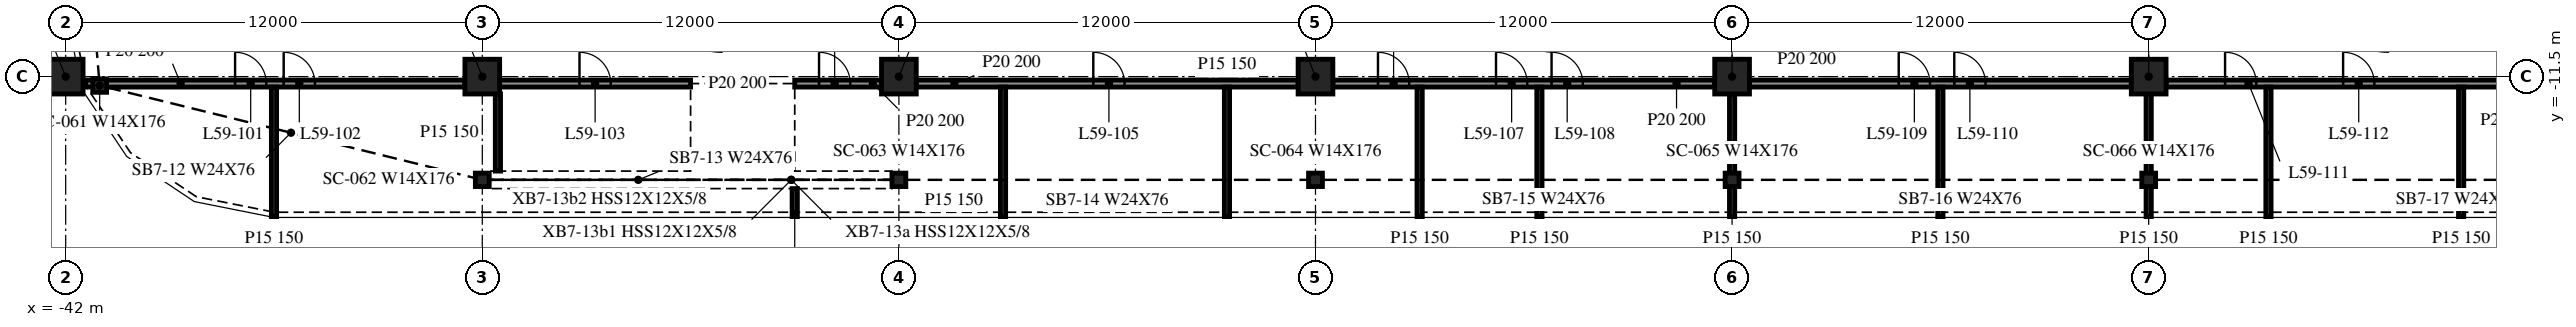
"""IFC4 building model, lengths in metres.
Left out: names, types, materials, properties, quantities, classifications, styles, units other than length and angle.
Written with IfcOpenShell. Run it as: python <this file> out.ifc"""

import sys

from ifc_helpers import new_model, si_unit, direction, frame, frame_2d, origin, origin_2d, place, context, subcontext, project, spatial, rectangle, i_section, extrude, element, fill, save


model = new_model("IFC4")
c1 = context("Model", 3, precision=1e-05, world=origin(), true_north=direction((0.0, 1.0)))
c2 = subcontext(c1, "Body", "Model", "MODEL_VIEW")
j1 = project(units=[si_unit("LENGTHUNIT", "METRE"), si_unit("PLANEANGLEUNIT", "RADIAN")], contexts=[c1])
p1 = place(None, origin())
s1 = spatial("IfcSite", under=j1, at=p1, CompositionType="ELEMENT")
p2 = place(p1, origin())
s2 = spatial("IfcBuilding", under=s1, at=p2, CompositionType="ELEMENT")
p3 = place(p2, frame((0.0, 0.0, 243.8)))
s3 = spatial("IfcBuildingStorey", under=s2, at=p3, CompositionType="ELEMENT", Elevation=243.8)
for number, where, z_axis, x_axis in (
    (1, (-42.0, -11.5, -0.34), (0.0, 0.0, 1.0), (1.0, 0.0, 0.0)),
    (2, (-30.0, -11.5, -0.34), (0.0, 0.0, 1.0), (1.0, 0.0, 0.0)),
    (3, (-18.0, -11.5, -0.34), (0.0, 0.0, 1.0), (1.0, 0.0, 0.0)),
    (4, (-6.0, -11.5, -0.34), (0.0, 0.0, 1.0), (1.0, 0.0, 0.0)),
    (5, (6.0, -11.5, -0.34), (0.0, 0.0, 1.0), (1.0, 0.0, 0.0)),
    (6, (18.0, -11.5, -0.34), (0.0, 0.0, 1.0), (1.0, 0.0, 0.0)),
):
    element("IfcColumn", number, at=place(p3, frame(where, z_axis=z_axis, x_axis=x_axis)), inside=s3, PredefinedType="COLUMN", context=c2, shape_type="SweptSolid", body=[
        extrude(rectangle(XDim=1.0, YDim=1.0, at=origin_2d()), origin(), (0.0, 0.0, 1.0), 3.8),
    ])
for number, where, z_axis, x_axis in (
    (7, (-41.021, -11.758, -0.34), (0.0, 0.0, 1.0), (1.0, 0.0, 0.0)),
    (8, (-30.0, -14.473, -0.34), (0.0, 0.0, 1.0), (1.0, 0.0, 0.0)),
    (9, (-18.0, -14.473, -0.34), (0.0, 0.0, 1.0), (1.0, 0.0, 0.0)),
    (10, (-6.0, -14.473, -0.34), (0.0, 0.0, 1.0), (1.0, 0.0, 0.0)),
    (11, (6.0, -14.473, -0.34), (0.0, 0.0, 1.0), (1.0, 0.0, 0.0)),
    (12, (18.0, -14.473, -0.34), (0.0, 0.0, 1.0), (1.0, 0.0, 0.0)),
):
    element("IfcColumn", number, at=place(p3, frame(where, z_axis=z_axis, x_axis=x_axis)), inside=s3, PredefinedType="COLUMN", context=c2, shape_type="SweptSolid", body=[
        extrude(i_section(OverallWidth=0.399, OverallDepth=0.386, WebThickness=0.021, FlangeThickness=0.033, at=origin_2d()), origin(), (0.0, 0.0, 1.0), 3.8),
    ])
p4 = place(p3, frame((-41.421, -11.7, 0.0), z_axis=(0.0, 0.0, 1.0), x_axis=(1.0, 0.0, 0.0)))
e13 = element("IfcWall", 13, at=p4, inside=s3, PredefinedType="PARTITIONING", context=c2, shape_type="SweptSolid", body=[
    extrude(rectangle(XDim=10.921, YDim=0.2, at=frame_2d((5.46, 0.0))), origin(), (0.0, 0.0, 1.0), 3.46),
])
p5 = place(p4, frame((4.3, 0.0, 0.0)))
e14 = element("IfcOpeningElement", 14, at=p5, cuts=e13, PredefinedType="OPENING", context=c2, shape_type="SweptSolid", body=[
    extrude(rectangle(XDim=0.9, YDim=2.1, at=frame_2d((0.45, 1.05))), frame((0.0, 0.11, 0.0), z_axis=(0.0, -1.0, 0.0), x_axis=(1.0, 0.0, 0.0)), (0.0, 0.0, 1.0), 0.22),
])
p6 = place(p4, frame((5.7, 0.0, 0.0)))
e15 = element("IfcOpeningElement", 15, at=p6, cuts=e13, PredefinedType="OPENING", context=c2, shape_type="SweptSolid", body=[
    extrude(rectangle(XDim=0.9, YDim=2.1, at=frame_2d((0.45, 1.05))), frame((0.0, 0.11, 0.0), z_axis=(0.0, -1.0, 0.0), x_axis=(1.0, 0.0, 0.0)), (0.0, 0.0, 1.0), 0.22),
])
p7 = place(p3, frame((-29.5, -11.7, 0.0), z_axis=(0.0, 0.0, 1.0), x_axis=(1.0, 0.0, 0.0)))
e16 = element("IfcWall", 16, at=p7, inside=s3, PredefinedType="PARTITIONING", context=c2, shape_type="SweptSolid", body=[
    extrude(rectangle(XDim=5.5, YDim=0.2, at=frame_2d((2.75, 0.0))), origin(), (0.0, 0.0, 1.0), 3.46),
])
p8 = place(p7, frame((2.3, 0.0, 0.0)))
e17 = element("IfcOpeningElement", 17, at=p8, cuts=e16, PredefinedType="OPENING", context=c2, shape_type="SweptSolid", body=[
    extrude(rectangle(XDim=0.9, YDim=2.1, at=frame_2d((0.45, 1.05))), frame((0.0, 0.11, 0.0), z_axis=(0.0, -1.0, 0.0), x_axis=(1.0, 0.0, 0.0)), (0.0, 0.0, 1.0), 0.22),
])
p9 = place(p3, frame((-21.0, -11.7, 0.0), z_axis=(0.0, 0.0, 1.0), x_axis=(1.0, 0.0, 0.0)))
e18 = element("IfcWall", 18, at=p9, inside=s3, PredefinedType="PARTITIONING", context=c2, shape_type="SweptSolid", body=[
    extrude(rectangle(XDim=2.5, YDim=0.2, at=frame_2d((1.25, 0.0))), origin(), (0.0, 0.0, 1.0), 3.46),
])
p10 = place(p9, frame((0.7, 0.0, 0.0)))
e19 = element("IfcOpeningElement", 19, at=p10, cuts=e18, PredefinedType="OPENING", context=c2, shape_type="SweptSolid", body=[
    extrude(rectangle(XDim=0.9, YDim=2.1, at=frame_2d((0.45, 1.05))), frame((0.0, 0.11, 0.0), z_axis=(0.0, -1.0, 0.0), x_axis=(1.0, 0.0, 0.0)), (0.0, 0.0, 1.0), 0.22),
])
p11 = place(p3, frame((-17.5, -11.7, 0.0), z_axis=(0.0, 0.0, 1.0), x_axis=(1.0, 0.0, 0.0)))
e20 = element("IfcWall", 20, at=p11, inside=s3, PredefinedType="PARTITIONING", context=c2, shape_type="SweptSolid", body=[
    extrude(rectangle(XDim=11.0, YDim=0.2, at=frame_2d((5.5, 0.0))), origin(), (0.0, 0.0, 1.0), 3.46),
])
p12 = place(p11, frame((5.1, 0.0, 0.0)))
e21 = element("IfcOpeningElement", 21, at=p12, cuts=e20, PredefinedType="OPENING", context=c2, shape_type="SweptSolid", body=[
    extrude(rectangle(XDim=0.9, YDim=2.1, at=frame_2d((0.45, 1.05))), frame((0.0, 0.11, 0.0), z_axis=(0.0, -1.0, 0.0), x_axis=(1.0, 0.0, 0.0)), (0.0, 0.0, 1.0), 0.22),
])
p13 = place(p3, frame((-5.5, -11.7, 0.0), z_axis=(0.0, 0.0, 1.0), x_axis=(1.0, 0.0, 0.0)))
e22 = element("IfcWall", 22, at=p13, inside=s3, PredefinedType="PARTITIONING", context=c2, shape_type="SweptSolid", body=[
    extrude(rectangle(XDim=11.0, YDim=0.2, at=frame_2d((5.5, 0.0))), origin(), (0.0, 0.0, 1.0), 3.46),
])
p14 = place(p13, frame((1.3, 0.0, 0.0)))
e23 = element("IfcOpeningElement", 23, at=p14, cuts=e22, PredefinedType="OPENING", context=c2, shape_type="SweptSolid", body=[
    extrude(rectangle(XDim=0.9, YDim=2.1, at=frame_2d((0.45, 1.05))), frame((0.0, 0.11, 0.0), z_axis=(0.0, -1.0, 0.0), x_axis=(1.0, 0.0, 0.0)), (0.0, 0.0, 1.0), 0.22),
])
p15 = place(p13, frame((4.7, 0.0, 0.0)))
e24 = element("IfcOpeningElement", 24, at=p15, cuts=e22, PredefinedType="OPENING", context=c2, shape_type="SweptSolid", body=[
    extrude(rectangle(XDim=0.9, YDim=2.1, at=frame_2d((0.45, 1.05))), frame((0.0, 0.11, 0.0), z_axis=(0.0, -1.0, 0.0), x_axis=(1.0, 0.0, 0.0)), (0.0, 0.0, 1.0), 0.22),
])
p16 = place(p13, frame((6.3, 0.0, 0.0)))
e25 = element("IfcOpeningElement", 25, at=p16, cuts=e22, PredefinedType="OPENING", context=c2, shape_type="SweptSolid", body=[
    extrude(rectangle(XDim=0.9, YDim=2.1, at=frame_2d((0.45, 1.05))), frame((0.0, 0.11, 0.0), z_axis=(0.0, -1.0, 0.0), x_axis=(1.0, 0.0, 0.0)), (0.0, 0.0, 1.0), 0.22),
])
p17 = place(p3, frame((6.5, -11.7, 0.0), z_axis=(0.0, 0.0, 1.0), x_axis=(1.0, 0.0, 0.0)))
e26 = element("IfcWall", 26, at=p17, inside=s3, PredefinedType="PARTITIONING", context=c2, shape_type="SweptSolid", body=[
    extrude(rectangle(XDim=11.0, YDim=0.2, at=frame_2d((5.5, 0.0))), origin(), (0.0, 0.0, 1.0), 3.46),
])
p18 = place(p17, frame((4.3, 0.0, 0.0)))
e27 = element("IfcOpeningElement", 27, at=p18, cuts=e26, PredefinedType="OPENING", context=c2, shape_type="SweptSolid", body=[
    extrude(rectangle(XDim=0.9, YDim=2.1, at=frame_2d((0.45, 1.05))), frame((0.0, 0.11, 0.0), z_axis=(0.0, -1.0, 0.0), x_axis=(1.0, 0.0, 0.0)), (0.0, 0.0, 1.0), 0.22),
])
p19 = place(p17, frame((5.9, 0.0, 0.0)))
e28 = element("IfcOpeningElement", 28, at=p19, cuts=e26, PredefinedType="OPENING", context=c2, shape_type="SweptSolid", body=[
    extrude(rectangle(XDim=0.9, YDim=2.1, at=frame_2d((0.45, 1.05))), frame((0.0, 0.11, 0.0), z_axis=(0.0, -1.0, 0.0), x_axis=(1.0, 0.0, 0.0)), (0.0, 0.0, 1.0), 0.22),
])
p20 = place(p3, frame((18.5, -11.7, 0.0), z_axis=(0.0, 0.0, 1.0), x_axis=(1.0, 0.0, 0.0)))
e29 = element("IfcWall", 29, at=p20, inside=s3, PredefinedType="PARTITIONING", context=c2, shape_type="SweptSolid", body=[
    extrude(rectangle(XDim=11.0, YDim=0.2, at=frame_2d((5.5, 0.0))), origin(), (0.0, 0.0, 1.0), 3.46),
])
p21 = place(p20, frame((1.7, 0.0, 0.0)))
e30 = element("IfcOpeningElement", 30, at=p21, cuts=e29, PredefinedType="OPENING", context=c2, shape_type="SweptSolid", body=[
    extrude(rectangle(XDim=0.9, YDim=2.1, at=frame_2d((0.45, 1.05))), frame((0.0, 0.11, 0.0), z_axis=(0.0, -1.0, 0.0), x_axis=(1.0, 0.0, 0.0)), (0.0, 0.0, 1.0), 0.22),
])
p22 = place(p20, frame((5.1, 0.0, 0.0)))
e31 = element("IfcOpeningElement", 31, at=p22, cuts=e29, PredefinedType="OPENING", context=c2, shape_type="SweptSolid", body=[
    extrude(rectangle(XDim=0.9, YDim=2.1, at=frame_2d((0.45, 1.05))), frame((0.0, 0.11, 0.0), z_axis=(0.0, -1.0, 0.0), x_axis=(1.0, 0.0, 0.0)), (0.0, 0.0, 1.0), 0.22),
])
p23 = place(p3, frame((-36.0, -15.531, 0.0), z_axis=(0.0, 0.0, 1.0), x_axis=(0.0, 1.0, 0.0)))
e32 = element("IfcWall", 32, at=p23, inside=s3, PredefinedType="PARTITIONING", context=c2, shape_type="SweptSolid", body=[
    extrude(rectangle(XDim=3.731, YDim=0.15, at=frame_2d((1.865, 0.0))), origin(), (0.0, 0.0, 1.0), 3.46),
])
p24 = place(p3, frame((-29.55, -14.221, 0.0), z_axis=(0.0, 0.0, 1.0), x_axis=(0.0, 1.0, 0.0)))
e33 = element("IfcWall", 33, at=p24, inside=s3, PredefinedType="PARTITIONING", context=c2, shape_type="SweptSolid", body=[
    extrude(rectangle(XDim=2.221, YDim=0.15, at=frame_2d((1.11, 0.0))), origin(), (0.0, 0.0, 1.0), 3.46),
])
p25 = place(p3, frame((-21.0, -15.531, 0.0), z_axis=(0.0, 0.0, 1.0), x_axis=(0.0, 1.0, 0.0)))
e34 = element("IfcWall", 34, at=p25, inside=s3, PredefinedType="PARTITIONING", context=c2, shape_type="SweptSolid", body=[
    extrude(rectangle(XDim=0.806, YDim=0.15, at=frame_2d((0.403, 0.0))), origin(), (0.0, 0.0, 1.0), 3.46),
])
for number, where, z_axis, x_axis in (
    (35, (-15.0, -15.531, 0.0), (0.0, 0.0, 1.0), (0.0, 1.0, 0.0)),
    (36, (-8.55, -15.531, 0.0), (0.0, 0.0, 1.0), (0.0, 1.0, 0.0)),
    (37, (-3.0, -15.531, 0.0), (0.0, 0.0, 1.0), (0.0, 1.0, 0.0)),
    (38, (0.45, -15.531, 0.0), (0.0, 0.0, 1.0), (0.0, 1.0, 0.0)),
):
    element("IfcWall", number, at=place(p3, frame(where, z_axis=z_axis, x_axis=x_axis)), inside=s3, PredefinedType="PARTITIONING", context=c2, shape_type="SweptSolid", body=[
        extrude(rectangle(XDim=3.731, YDim=0.15, at=frame_2d((1.865, 0.0))), origin(), (0.0, 0.0, 1.0), 3.46),
    ])
p26 = place(p3, frame((6.0, -15.531, 0.0), z_axis=(0.0, 0.0, 1.0), x_axis=(0.0, 1.0, 0.0)))
e39 = element("IfcWall", 39, at=p26, inside=s3, PredefinedType="PARTITIONING", context=c2, shape_type="SweptSolid", body=[
    extrude(rectangle(XDim=3.531, YDim=0.15, at=frame_2d((1.766, 0.0))), origin(), (0.0, 0.0, 1.0), 3.46),
])
p27 = place(p3, frame((12.0, -15.531, 0.0), z_axis=(0.0, 0.0, 1.0), x_axis=(0.0, 1.0, 0.0)))
e40 = element("IfcWall", 40, at=p27, inside=s3, PredefinedType="PARTITIONING", context=c2, shape_type="SweptSolid", body=[
    extrude(rectangle(XDim=3.731, YDim=0.15, at=frame_2d((1.865, 0.0))), origin(), (0.0, 0.0, 1.0), 3.46),
])
p28 = place(p3, frame((18.0, -15.531, 0.0), z_axis=(0.0, 0.0, 1.0), x_axis=(0.0, 1.0, 0.0)))
e41 = element("IfcWall", 41, at=p28, inside=s3, PredefinedType="PARTITIONING", context=c2, shape_type="SweptSolid", body=[
    extrude(rectangle(XDim=3.531, YDim=0.15, at=frame_2d((1.766, 0.0))), origin(), (0.0, 0.0, 1.0), 3.46),
])
for number, where, z_axis, x_axis in (
    (42, (21.45, -15.531, 0.0), (0.0, 0.0, 1.0), (0.0, 1.0, 0.0)),
    (43, (27.0, -15.531, 0.0), (0.0, 0.0, 1.0), (0.0, 1.0, 0.0)),
):
    element("IfcWall", number, at=place(p3, frame(where, z_axis=z_axis, x_axis=x_axis)), inside=s3, PredefinedType="PARTITIONING", context=c2, shape_type="SweptSolid", body=[
        extrude(rectangle(XDim=3.731, YDim=0.15, at=frame_2d((1.865, 0.0))), origin(), (0.0, 0.0, 1.0), 3.46),
    ])
p29 = place(p5, origin())
e44 = element("IfcDoor", 44, at=p29, inside=s3, OperationType="SINGLE_SWING_RIGHT", PredefinedType="DOOR", context=c2, shape_type="SweptSolid", body=[
    extrude(rectangle(XDim=0.9, YDim=2.1, at=frame_2d((0.45, 1.05))), frame((0.0, 0.025, 0.0), z_axis=(0.0, -1.0, 0.0), x_axis=(1.0, 0.0, 0.0)), (0.0, 0.0, 1.0), 0.05),
])
fill(e14, e44)
p30 = place(p6, origin())
e45 = element("IfcDoor", 45, at=p30, inside=s3, OperationType="SINGLE_SWING_LEFT", PredefinedType="DOOR", context=c2, shape_type="SweptSolid", body=[
    extrude(rectangle(XDim=0.9, YDim=2.1, at=frame_2d((0.45, 1.05))), frame((0.0, 0.025, 0.0), z_axis=(0.0, -1.0, 0.0), x_axis=(1.0, 0.0, 0.0)), (0.0, 0.0, 1.0), 0.05),
])
fill(e15, e45)
p31 = place(p8, origin())
e46 = element("IfcDoor", 46, at=p31, inside=s3, OperationType="SINGLE_SWING_RIGHT", PredefinedType="DOOR", context=c2, shape_type="SweptSolid", body=[
    extrude(rectangle(XDim=0.9, YDim=2.1, at=frame_2d((0.45, 1.05))), frame((0.0, 0.025, 0.0), z_axis=(0.0, -1.0, 0.0), x_axis=(1.0, 0.0, 0.0)), (0.0, 0.0, 1.0), 0.05),
])
fill(e17, e46)
p32 = place(p10, origin())
e47 = element("IfcDoor", 47, at=p32, inside=s3, OperationType="SINGLE_SWING_RIGHT", PredefinedType="DOOR", context=c2, shape_type="SweptSolid", body=[
    extrude(rectangle(XDim=0.9, YDim=2.1, at=frame_2d((0.45, 1.05))), frame((0.0, 0.025, 0.0), z_axis=(0.0, -1.0, 0.0), x_axis=(1.0, 0.0, 0.0)), (0.0, 0.0, 1.0), 0.05),
])
fill(e19, e47)
p33 = place(p12, origin())
e48 = element("IfcDoor", 48, at=p33, inside=s3, OperationType="SINGLE_SWING_LEFT", PredefinedType="DOOR", context=c2, shape_type="SweptSolid", body=[
    extrude(rectangle(XDim=0.9, YDim=2.1, at=frame_2d((0.45, 1.05))), frame((0.0, 0.025, 0.0), z_axis=(0.0, -1.0, 0.0), x_axis=(1.0, 0.0, 0.0)), (0.0, 0.0, 1.0), 0.05),
])
fill(e21, e48)
p34 = place(p14, origin())
e49 = element("IfcDoor", 49, at=p34, inside=s3, OperationType="SINGLE_SWING_RIGHT", PredefinedType="DOOR", context=c2, shape_type="SweptSolid", body=[
    extrude(rectangle(XDim=0.9, YDim=2.1, at=frame_2d((0.45, 1.05))), frame((0.0, 0.025, 0.0), z_axis=(0.0, -1.0, 0.0), x_axis=(1.0, 0.0, 0.0)), (0.0, 0.0, 1.0), 0.05),
])
fill(e23, e49)
p35 = place(p15, origin())
e50 = element("IfcDoor", 50, at=p35, inside=s3, OperationType="SINGLE_SWING_RIGHT", PredefinedType="DOOR", context=c2, shape_type="SweptSolid", body=[
    extrude(rectangle(XDim=0.9, YDim=2.1, at=frame_2d((0.45, 1.05))), frame((0.0, 0.025, 0.0), z_axis=(0.0, -1.0, 0.0), x_axis=(1.0, 0.0, 0.0)), (0.0, 0.0, 1.0), 0.05),
])
fill(e24, e50)
p36 = place(p16, origin())
e51 = element("IfcDoor", 51, at=p36, inside=s3, OperationType="SINGLE_SWING_LEFT", PredefinedType="DOOR", context=c2, shape_type="SweptSolid", body=[
    extrude(rectangle(XDim=0.9, YDim=2.1, at=frame_2d((0.45, 1.05))), frame((0.0, 0.025, 0.0), z_axis=(0.0, -1.0, 0.0), x_axis=(1.0, 0.0, 0.0)), (0.0, 0.0, 1.0), 0.05),
])
fill(e25, e51)
p37 = place(p18, origin())
e52 = element("IfcDoor", 52, at=p37, inside=s3, OperationType="SINGLE_SWING_RIGHT", PredefinedType="DOOR", context=c2, shape_type="SweptSolid", body=[
    extrude(rectangle(XDim=0.9, YDim=2.1, at=frame_2d((0.45, 1.05))), frame((0.0, 0.025, 0.0), z_axis=(0.0, -1.0, 0.0), x_axis=(1.0, 0.0, 0.0)), (0.0, 0.0, 1.0), 0.05),
])
fill(e27, e52)
p38 = place(p19, origin())
e53 = element("IfcDoor", 53, at=p38, inside=s3, OperationType="SINGLE_SWING_LEFT", PredefinedType="DOOR", context=c2, shape_type="SweptSolid", body=[
    extrude(rectangle(XDim=0.9, YDim=2.1, at=frame_2d((0.45, 1.05))), frame((0.0, 0.025, 0.0), z_axis=(0.0, -1.0, 0.0), x_axis=(1.0, 0.0, 0.0)), (0.0, 0.0, 1.0), 0.05),
])
fill(e28, e53)
p39 = place(p21, origin())
e54 = element("IfcDoor", 54, at=p39, inside=s3, OperationType="SINGLE_SWING_RIGHT", PredefinedType="DOOR", context=c2, shape_type="SweptSolid", body=[
    extrude(rectangle(XDim=0.9, YDim=2.1, at=frame_2d((0.45, 1.05))), frame((0.0, 0.025, 0.0), z_axis=(0.0, -1.0, 0.0), x_axis=(1.0, 0.0, 0.0)), (0.0, 0.0, 1.0), 0.05),
])
fill(e30, e54)
p40 = place(p22, origin())
e55 = element("IfcDoor", 55, at=p40, inside=s3, OperationType="SINGLE_SWING_LEFT", PredefinedType="DOOR", context=c2, shape_type="SweptSolid", body=[
    extrude(rectangle(XDim=0.9, YDim=2.1, at=frame_2d((0.45, 1.05))), frame((0.0, 0.025, 0.0), z_axis=(0.0, -1.0, 0.0), x_axis=(1.0, 0.0, 0.0)), (0.0, 0.0, 1.0), 0.05),
])
fill(e31, e55)
save(model, sys.argv[1])
